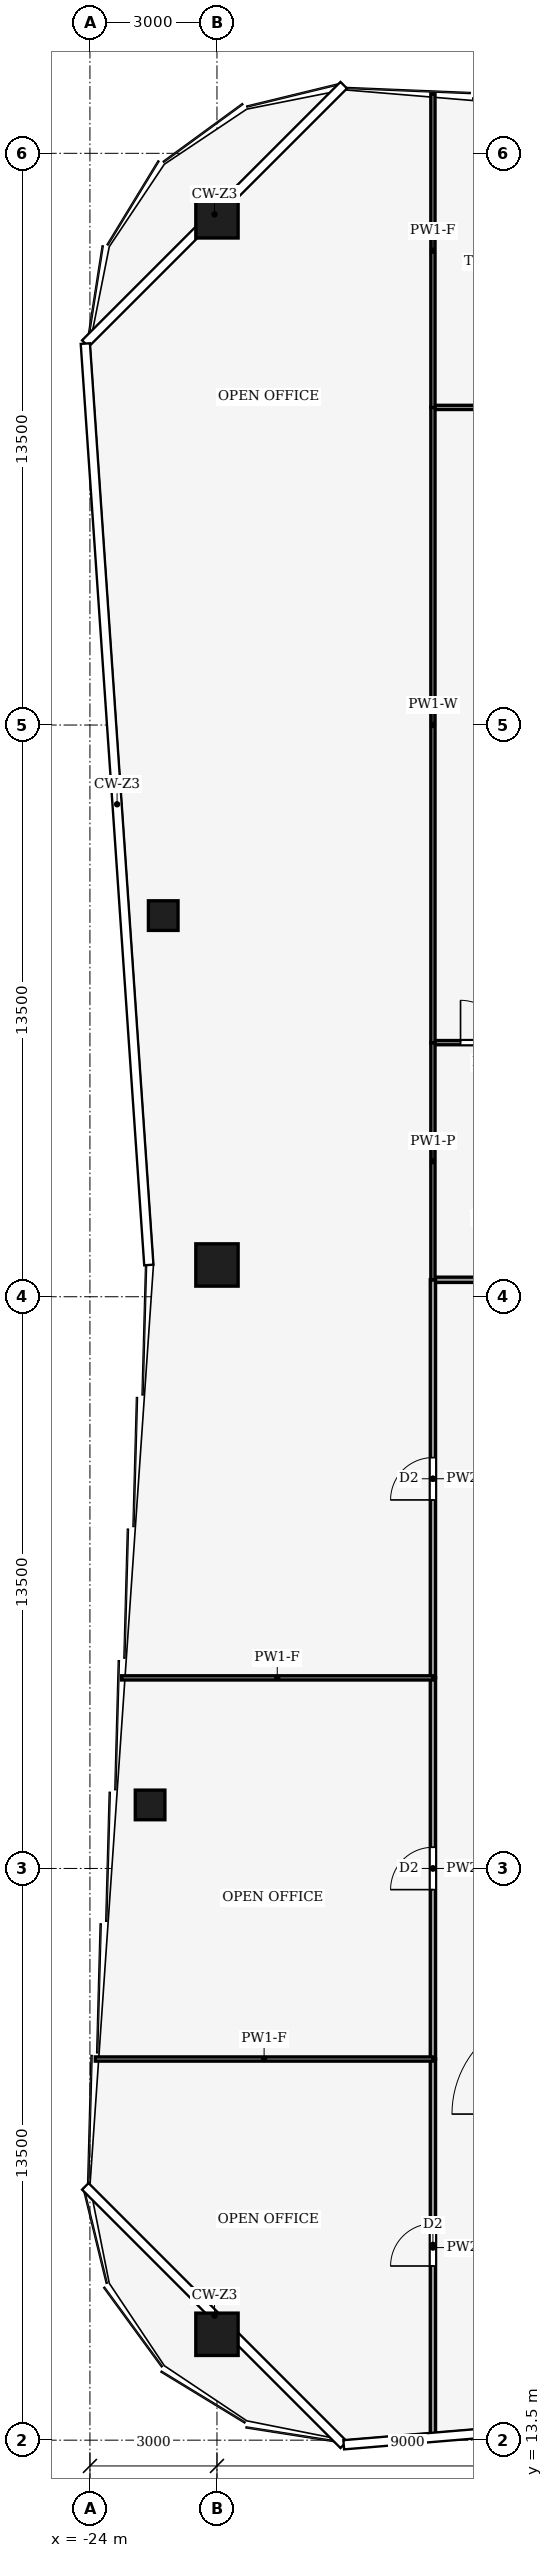
"""IFC4 building model, lengths in metres.
Left out: names, types, materials, properties, quantities, classifications, styles, units other than length and angle.
Written with IfcOpenShell. Run it as: python <this file> out.ifc"""

import sys

from ifc_helpers import new_model, si_unit, direction, frame, frame_2d, origin, origin_2d, place, context, subcontext, project, spatial, rectangle, hollow_rectangle, extrude, element, fill, save


model = new_model("IFC4")
c1 = context("Model", 3, precision=1e-05, world=origin(), true_north=direction((0.0, 1.0)))
c2 = subcontext(c1, "Body", "Model", "MODEL_VIEW")
j1 = project(units=[si_unit("LENGTHUNIT", "METRE"), si_unit("PLANEANGLEUNIT", "RADIAN")], contexts=[c1])
p1 = place(None, origin())
s1 = spatial("IfcSite", under=j1, at=p1, CompositionType="ELEMENT")
p2 = place(p1, origin())
s2 = spatial("IfcBuilding", under=s1, at=p2, CompositionType="ELEMENT")
p3 = place(p2, frame((0.0, 0.0, 210.0)))
s3 = spatial("IfcBuildingStorey", under=s2, at=p3, CompositionType="ELEMENT", Elevation=210.0)
for number, where, z_axis, x_axis in (
    (1, (-21.0, 66.0, 0.0), (0.0, 0.0, 1.0), (1.0, 0.0, 0.0)),
    (2, (-21.0, 16.0, 0.0), (0.0, 0.0, 1.0), (1.0, 0.0, 0.0)),
    (3, (-21.0, 41.25, 0.0), (0.0, 0.0, 1.0), (1.0, 0.0, 0.0)),
):
    element("IfcColumn", number, at=place(p3, frame(where, z_axis=z_axis, x_axis=x_axis)), inside=s3, PredefinedType="COLUMN", context=c2, shape_type="SweptSolid", body=[
        extrude(hollow_rectangle(XDim=1.0, YDim=1.0, WallThickness=0.06, at=origin_2d()), origin(), (0.0, 0.0, 1.0), 4.0),
    ])
for number, where, z_axis, x_axis in (
    (4, (-22.579, 28.5, 0.0), (0.0, 0.0, 1.0), (1.0, 0.0, 0.0)),
    (5, (-22.269, 49.5, 0.0), (0.0, 0.0, 1.0), (1.0, 0.0, 0.0)),
):
    element("IfcColumn", number, at=place(p3, frame(where, z_axis=z_axis, x_axis=x_axis)), inside=s3, PredefinedType="COLUMN", context=c2, shape_type="SweptSolid", body=[
        extrude(hollow_rectangle(XDim=0.7, YDim=0.7, WallThickness=0.03, at=origin_2d()), origin(), (0.0, 0.0, 1.0), 4.0),
    ])
p4 = place(p3, frame((-15.9, 40.9, 0.0), z_axis=(0.0, 0.0, 1.0), x_axis=(1.0, 0.0, 0.0)))
e6 = element("IfcWall", 6, at=p4, inside=s3, PredefinedType="PARTITIONING", context=c2, shape_type="SweptSolid", body=[
    extrude(rectangle(XDim=3.9, YDim=0.125, at=frame_2d((1.95, 0.0))), origin(), (0.0, 0.0, 1.0), 3.44),
])
p5 = place(p4, frame((1.45, 0.0, 0.0)))
e7 = element("IfcOpeningElement", 7, at=p5, cuts=e6, PredefinedType="OPENING", context=c2, shape_type="SweptSolid", body=[
    extrude(rectangle(XDim=1.0, YDim=2.1, at=frame_2d((0.5, 1.05))), frame((0.0, 0.073, 0.0), z_axis=(0.0, -1.0, 0.0), x_axis=(1.0, 0.0, 0.0)), (0.0, 0.0, 1.0), 0.145),
])
p6 = place(p3, frame((-15.9, 13.595, 0.0), z_axis=(0.0, 0.0, 1.0), x_axis=(0.0, 1.0, 0.0)))
e8 = element("IfcWall", 8, at=p6, inside=s3, PredefinedType="PARTITIONING", context=c2, shape_type="SweptSolid", body=[
    extrude(rectangle(XDim=8.905, YDim=0.125, at=frame_2d((4.453, 0.0))), origin(), (0.0, 0.0, 1.0), 3.04),
])
p7 = place(p6, frame((4.018, 0.0, 0.0)))
e9 = element("IfcOpeningElement", 9, at=p7, cuts=e8, PredefinedType="OPENING", context=c2, shape_type="SweptSolid", body=[
    extrude(rectangle(XDim=1.0, YDim=2.1, at=frame_2d((0.5, 1.05))), frame((0.0, 0.073, 0.0), z_axis=(0.0, -1.0, 0.0), x_axis=(1.0, 0.0, 0.0)), (0.0, 0.0, 1.0), 0.145),
])
p8 = place(p3, frame((-15.9, 22.5, 0.0), z_axis=(0.0, 0.0, 1.0), x_axis=(0.0, 1.0, 0.0)))
e10 = element("IfcWall", 10, at=p8, inside=s3, PredefinedType="PARTITIONING", context=c2, shape_type="SweptSolid", body=[
    extrude(rectangle(XDim=9.0, YDim=0.125, at=frame_2d((4.5, 0.0))), origin(), (0.0, 0.0, 1.0), 3.44),
])
p9 = place(p8, frame((4.0, 0.0, 0.0)))
e11 = element("IfcOpeningElement", 11, at=p9, cuts=e10, PredefinedType="OPENING", context=c2, shape_type="SweptSolid", body=[
    extrude(rectangle(XDim=1.0, YDim=2.1, at=frame_2d((0.5, 1.05))), frame((0.0, 0.073, 0.0), z_axis=(0.0, -1.0, 0.0), x_axis=(1.0, 0.0, 0.0)), (0.0, 0.0, 1.0), 0.145),
])
p10 = place(p3, frame((-15.9, 31.5, 0.0), z_axis=(0.0, 0.0, 1.0), x_axis=(0.0, 1.0, 0.0)))
e12 = element("IfcWall", 12, at=p10, inside=s3, PredefinedType="PARTITIONING", context=c2, shape_type="SweptSolid", body=[
    extrude(rectangle(XDim=9.404, YDim=0.125, at=frame_2d((4.702, 0.0))), origin(), (0.0, 0.0, 1.0), 3.14),
])
p11 = place(p10, frame((4.202, 0.0, 0.0)))
e13 = element("IfcOpeningElement", 13, at=p11, cuts=e12, PredefinedType="OPENING", context=c2, shape_type="SweptSolid", body=[
    extrude(rectangle(XDim=1.0, YDim=2.1, at=frame_2d((0.5, 1.05))), frame((0.0, 0.073, 0.0), z_axis=(0.0, -1.0, 0.0), x_axis=(1.0, 0.0, 0.0)), (0.0, 0.0, 1.0), 0.145),
])
p12 = place(p3, frame((-15.9, 46.5, 0.0), z_axis=(0.0, 0.0, 1.0), x_axis=(1.0, 0.0, 0.0)))
e14 = element("IfcWall", 14, at=p12, inside=s3, PredefinedType="PARTITIONING", context=c2, shape_type="SweptSolid", body=[
    extrude(rectangle(XDim=3.904, YDim=0.1, at=frame_2d((1.952, 0.0))), origin(), (0.0, 0.0, 1.0), 3.87),
])
p13 = place(p12, frame((0.652, 0.0, 0.0)))
e15 = element("IfcOpeningElement", 15, at=p13, cuts=e14, PredefinedType="OPENING", context=c2, shape_type="SweptSolid", body=[
    extrude(rectangle(XDim=1.0, YDim=2.1, at=frame_2d((0.5, 1.05))), frame((0.0, 0.06, 0.0), z_axis=(0.0, -1.0, 0.0), x_axis=(1.0, 0.0, 0.0)), (0.0, 0.0, 1.0), 0.12),
])
p14 = place(p3, frame((-15.9, 46.504, 0.0), z_axis=(0.0, 0.0, 1.0), x_axis=(0.0, -1.0, 0.0)))
e16 = element("IfcWall", 16, at=p14, inside=s3, PredefinedType="PARTITIONING", context=c2, shape_type="SweptSolid", body=[
    extrude(rectangle(XDim=5.608, YDim=0.1, at=frame_2d((2.804, 0.0))), origin(), (0.0, 0.0, 1.0), 3.44),
])
p15 = place(p3, frame((-15.9, 61.5, 0.0), z_axis=(0.0, 0.0, 1.0), x_axis=(1.0, 0.0, 0.0)))
e17 = element("IfcWall", 17, at=p15, inside=s3, PredefinedType="PARTITIONING", context=c2, shape_type="SweptSolid", body=[
    extrude(rectangle(XDim=12.9, YDim=0.1, at=frame_2d((6.45, 0.0))), origin(), (0.0, 0.0, 1.0), 3.24),
])
p16 = place(p15, frame((5.95, 0.0, 0.0)))
e18 = element("IfcOpeningElement", 18, at=p16, cuts=e17, PredefinedType="OPENING", context=c2, shape_type="SweptSolid", body=[
    extrude(rectangle(XDim=1.0, YDim=2.1, at=frame_2d((0.5, 1.05))), frame((0.0, 0.06, 0.0), z_axis=(0.0, -1.0, 0.0), x_axis=(1.0, 0.0, 0.0)), (0.0, 0.0, 1.0), 0.12),
])
p17 = place(p3, frame((-15.9, 61.504, 0.0), z_axis=(0.0, 0.0, 1.0), x_axis=(0.0, -1.0, 0.0)))
e19 = element("IfcWall", 19, at=p17, inside=s3, PredefinedType="PARTITIONING", context=c2, shape_type="SweptSolid", body=[
    extrude(rectangle(XDim=15.008, YDim=0.1, at=frame_2d((7.504, 0.0))), origin(), (0.0, 0.0, 1.0), 3.24),
])
p18 = place(p3, frame((-15.9, 68.905, 0.0), z_axis=(0.0, 0.0, 1.0), x_axis=(0.0, -1.0, 0.0)))
e20 = element("IfcWall", 20, at=p18, inside=s3, PredefinedType="PARTITIONING", context=c2, shape_type="SweptSolid", body=[
    extrude(rectangle(XDim=7.409, YDim=0.1, at=frame_2d((3.705, 0.0))), origin(), (0.0, 0.0, 1.0), 3.04),
])
p19 = place(p3, frame((-15.9, 22.5, 0.0), z_axis=(0.0, 0.0, 1.0), x_axis=(-1.0, 0.0, 0.0)))
e21 = element("IfcWall", 21, at=p19, inside=s3, PredefinedType="PARTITIONING", context=c2, shape_type="SweptSolid", body=[
    extrude(rectangle(XDim=7.973, YDim=0.1, at=frame_2d((3.987, 0.0))), origin(), (0.0, 0.0, 1.0), 3.04),
])
p20 = place(p3, frame((-15.9, 31.5, 0.0), z_axis=(0.0, 0.0, 1.0), x_axis=(-1.0, 0.0, 0.0)))
e22 = element("IfcWall", 22, at=p20, inside=s3, PredefinedType="PARTITIONING", context=c2, shape_type="SweptSolid", body=[
    extrude(rectangle(XDim=7.353, YDim=0.1, at=frame_2d((3.676, 0.0))), origin(), (0.0, 0.0, 1.0), 3.04),
])
p21 = place(p7, origin())
e23 = element("IfcDoor", 23, at=p21, inside=s3, OperationType="SINGLE_SWING_RIGHT", PredefinedType="DOOR", context=c2, shape_type="SweptSolid", body=[
    extrude(rectangle(XDim=1.0, YDim=2.1, at=frame_2d((0.5, 1.05))), frame((0.0, 0.025, 0.0), z_axis=(0.0, -1.0, 0.0), x_axis=(1.0, 0.0, 0.0)), (0.0, 0.0, 1.0), 0.05),
])
fill(e9, e23)
p22 = place(p9, origin())
e24 = element("IfcDoor", 24, at=p22, inside=s3, OperationType="SINGLE_SWING_RIGHT", PredefinedType="DOOR", context=c2, shape_type="SweptSolid", body=[
    extrude(rectangle(XDim=1.0, YDim=2.1, at=frame_2d((0.5, 1.05))), frame((0.0, 0.025, 0.0), z_axis=(0.0, -1.0, 0.0), x_axis=(1.0, 0.0, 0.0)), (0.0, 0.0, 1.0), 0.05),
])
fill(e11, e24)
p23 = place(p11, origin())
e25 = element("IfcDoor", 25, at=p23, inside=s3, OperationType="SINGLE_SWING_LEFT", PredefinedType="DOOR", context=c2, shape_type="SweptSolid", body=[
    extrude(rectangle(XDim=1.0, YDim=2.1, at=frame_2d((0.5, 1.05))), frame((0.0, 0.025, 0.0), z_axis=(0.0, -1.0, 0.0), x_axis=(1.0, 0.0, 0.0)), (0.0, 0.0, 1.0), 0.05),
])
fill(e13, e25)
p24 = place(p13, origin())
e26 = element("IfcDoor", 26, at=p24, inside=s3, OperationType="SINGLE_SWING_LEFT", PredefinedType="DOOR", context=c2, shape_type="SweptSolid", body=[
    extrude(rectangle(XDim=1.0, YDim=2.1, at=frame_2d((0.5, 1.05))), frame((0.0, 0.025, 0.0), z_axis=(0.0, -1.0, 0.0), x_axis=(1.0, 0.0, 0.0)), (0.0, 0.0, 1.0), 0.05),
])
fill(e15, e26)
save(model, sys.argv[1])
